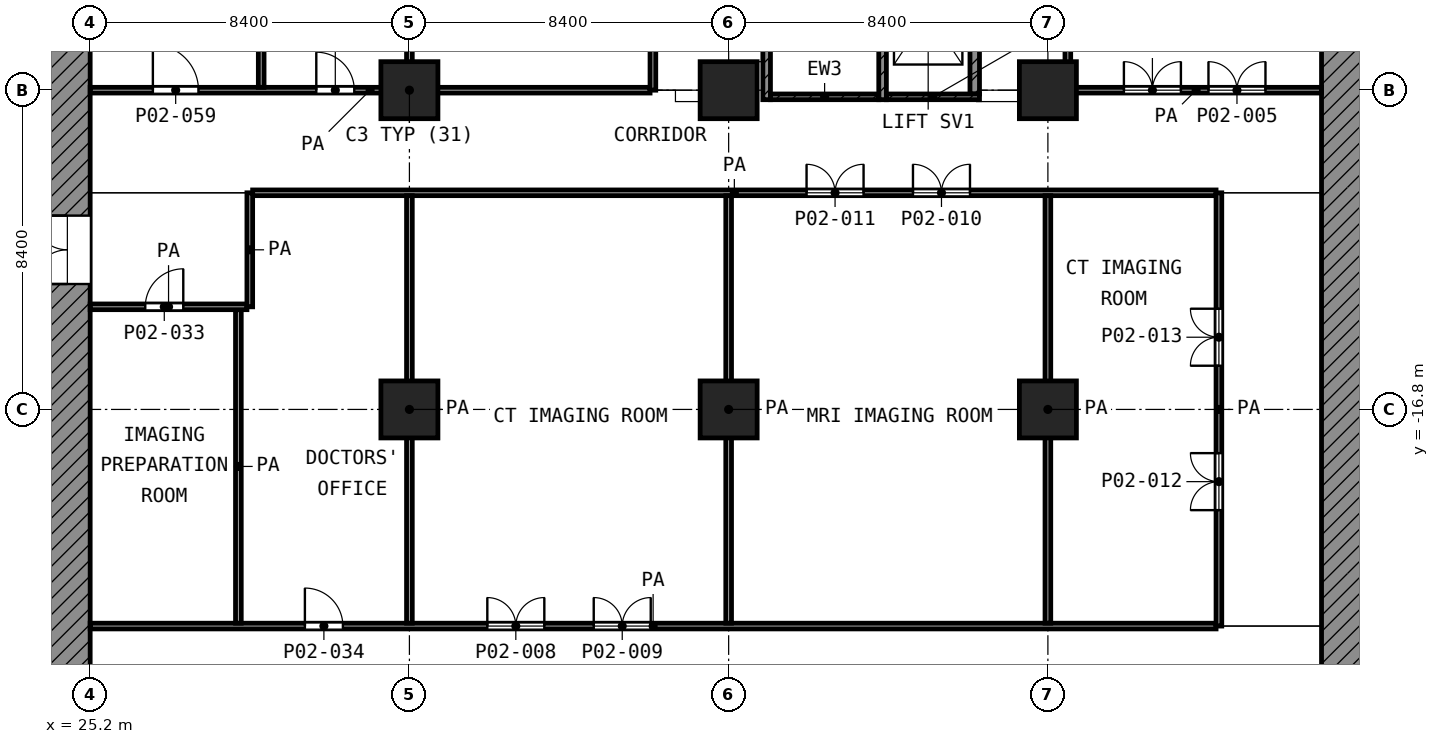
"""IFC4 building model, lengths in metres.
Left out: names, types, materials, properties, quantities, classifications, styles, units other than length and angle.
Written with IfcOpenShell. Run it as: python <this file> out.ifc"""

import sys

from ifc_helpers import new_model, si_unit, direction, frame, frame_2d, origin, origin_2d, place, context, subcontext, project, spatial, polyline, rectangle, outline, extrude, element, fill, save


model = new_model("IFC4")
c1 = context("Model", 3, precision=1e-05, world=origin(), true_north=direction((0.0, 1.0)))
c2 = subcontext(c1, "Body", "Model", "MODEL_VIEW")
j1 = project(units=[si_unit("LENGTHUNIT", "METRE"), si_unit("PLANEANGLEUNIT", "RADIAN")], contexts=[c1])
p1 = place(None, origin())
s1 = spatial("IfcSite", under=j1, at=p1, CompositionType="ELEMENT")
p2 = place(p1, origin())
s2 = spatial("IfcBuilding", under=s1, at=p2, CompositionType="ELEMENT")
p3 = place(p2, frame((0.0, 0.0, 7.0)))
s3 = spatial("IfcBuildingStorey", under=s2, at=p3, CompositionType="ELEMENT", Elevation=7.0)
for number, where, z_axis, x_axis in (
    (1, (33.6, -8.4, 0.0), (0.0, 0.0, 1.0), (1.0, 0.0, 0.0)),
    (2, (42.0, -8.4, 0.0), (0.0, 0.0, 1.0), (1.0, 0.0, 0.0)),
    (3, (50.4, -8.4, 0.0), (0.0, 0.0, 1.0), (1.0, 0.0, 0.0)),
    (4, (33.6, -16.8, 0.0), (0.0, 0.0, 1.0), (1.0, 0.0, 0.0)),
    (5, (42.0, -16.8, 0.0), (0.0, 0.0, 1.0), (1.0, 0.0, 0.0)),
    (6, (50.4, -16.8, 0.0), (0.0, 0.0, 1.0), (1.0, 0.0, 0.0)),
):
    element("IfcColumn", number, at=place(p3, frame(where, z_axis=z_axis, x_axis=x_axis)), inside=s3, PredefinedType="COLUMN", context=c2, shape_type="SweptSolid", body=[
        extrude(rectangle(XDim=1.5, YDim=1.5, at=origin_2d()), origin(), (0.0, 0.0, 1.0), 5.6),
    ])
p4 = place(p3, frame((0.0, 0.0, -7.0), z_axis=(0.0, -1.0, 0.0), x_axis=(1.0, 0.0, 0.0)))
e7 = element("IfcWall", 7, at=p4, inside=s3, PredefinedType="SHEAR", context=c2, shape_type="SweptSolid", body=[
    extrude(outline(polyline([(60.448, 12.6), (60.159, 11.256), (60.0, 9.0), (60.0, 7.0), (57.6, 7.0), (57.6, 12.6), (60.448, 12.6)])), origin(), (0.0, 0.0, 1.0), 33.6),
])
p5 = place(p3, frame((24.6, -24.0, 0.0), z_axis=(0.0, 0.0, 1.0), x_axis=(0.0, 1.0, 0.0)))
e8 = element("IfcWall", 8, at=p5, inside=s3, PredefinedType="SHEAR", context=c2, shape_type="SweptSolid", body=[
    extrude(rectangle(XDim=18.6, YDim=1.2, at=frame_2d((9.3, 0.0))), origin(), (0.0, 0.0, 1.0), 5.25),
])
p6 = place(p5, frame((10.5, 0.0, 0.0)))
e9 = element("IfcOpeningElement", 9, at=p6, cuts=e8, PredefinedType="OPENING", context=c2, shape_type="SweptSolid", body=[
    extrude(rectangle(XDim=1.8, YDim=2.1, at=frame_2d((0.9, 1.05))), frame((0.0, 0.61, 0.0), z_axis=(0.0, -1.0, 0.0), x_axis=(1.0, 0.0, 0.0)), (0.0, 0.0, 1.0), 1.22),
])
p7 = place(p3, frame((43.0, -8.65, 0.0), z_axis=(0.0, 0.0, 1.0), x_axis=(0.0, 1.0, 0.0)))
e10 = element("IfcWall", 10, at=p7, inside=s3, PredefinedType="SHEAR", context=c2, shape_type="SweptSolid", body=[
    extrude(rectangle(XDim=8.35, YDim=0.2, at=frame_2d((4.175, 0.0))), origin(), (0.0, 0.0, 1.0), 5.25),
])
p8 = place(p7, frame((7.0, 0.0, 0.0)))
e11 = element("IfcOpeningElement", 11, at=p8, cuts=e10, PredefinedType="OPENING", context=c2, shape_type="SweptSolid", body=[
    extrude(rectangle(XDim=1.1, YDim=2.1, at=frame_2d((0.55, 1.05))), frame((0.0, 0.11, 0.0), z_axis=(0.0, -1.0, 0.0), x_axis=(1.0, 0.0, 0.0)), (0.0, 0.0, 1.0), 0.22),
])
p9 = place(p3, frame((46.05, -8.65, 0.0), z_axis=(0.0, 0.0, 1.0), x_axis=(0.0, 1.0, 0.0)))
e12 = element("IfcWall", 12, at=p9, inside=s3, PredefinedType="SHEAR", context=c2, shape_type="SweptSolid", body=[
    extrude(rectangle(XDim=8.35, YDim=0.2, at=frame_2d((4.175, 0.0))), origin(), (0.0, 0.0, 1.0), 5.25),
])
p10 = place(p9, frame((7.0, 0.0, 0.0)))
e13 = element("IfcOpeningElement", 13, at=p10, cuts=e12, PredefinedType="OPENING", context=c2, shape_type="SweptSolid", body=[
    extrude(rectangle(XDim=1.1, YDim=2.1, at=frame_2d((0.55, 1.05))), frame((0.0, 0.11, 0.0), z_axis=(0.0, -1.0, 0.0), x_axis=(1.0, 0.0, 0.0)), (0.0, 0.0, 1.0), 0.22),
])
p11 = place(p3, frame((43.1, -8.575, 0.0), z_axis=(0.0, 0.0, 1.0), x_axis=(1.0, 0.0, 0.0)))
e14 = element("IfcWall", 14, at=p11, inside=s3, PredefinedType="SHEAR", context=c2, shape_type="SweptSolid", body=[
    extrude(rectangle(XDim=2.85, YDim=0.15, at=frame_2d((1.425, 0.0))), origin(), (0.0, 0.0, 1.0), 5.25),
])
p12 = place(p3, frame((46.15, -8.575, 0.0), z_axis=(0.0, 0.0, 1.0), x_axis=(1.0, 0.0, 0.0)))
e15 = element("IfcWall", 15, at=p12, inside=s3, PredefinedType="SHEAR", context=c2, shape_type="SweptSolid", body=[
    extrude(rectangle(XDim=2.45, YDim=0.15, at=frame_2d((1.225, 0.0))), origin(), (0.0, 0.0, 1.0), 5.25),
])
p13 = place(p3, frame((48.475, -8.5, 0.0), z_axis=(0.0, 0.0, 1.0), x_axis=(0.0, 1.0, 0.0)))
e16 = element("IfcWall", 16, at=p13, inside=s3, PredefinedType="SHEAR", context=c2, shape_type="SweptSolid", body=[
    extrude(rectangle(XDim=3.475, YDim=0.25, at=frame_2d((1.738, 0.0))), origin(), (0.0, 0.0, 1.0), 5.25),
])
p14 = place(p3, frame((25.2, -22.5, 0.0), z_axis=(0.0, 0.0, 1.0), x_axis=(1.0, 0.0, 0.0)))
e17 = element("IfcWall", 17, at=p14, inside=s3, PredefinedType="PARTITIONING", context=c2, shape_type="SweptSolid", body=[
    extrude(rectangle(XDim=29.625, YDim=0.15, at=frame_2d((14.812, 0.0))), origin(), (0.0, 0.0, 1.0), 5.25),
])
p15 = place(p14, frame((5.65, 0.0, 0.0)))
e18 = element("IfcOpeningElement", 18, at=p15, cuts=e17, PredefinedType="OPENING", context=c2, shape_type="SweptSolid", body=[
    extrude(rectangle(XDim=1.0, YDim=2.1, at=frame_2d((0.5, 1.05))), frame((0.0, 0.085, 0.0), z_axis=(0.0, -1.0, 0.0), x_axis=(1.0, 0.0, 0.0)), (0.0, 0.0, 1.0), 0.17),
])
p16 = place(p14, frame((10.45, 0.0, 0.0)))
e19 = element("IfcOpeningElement", 19, at=p16, cuts=e17, PredefinedType="OPENING", context=c2, shape_type="SweptSolid", body=[
    extrude(rectangle(XDim=1.5, YDim=2.1, at=frame_2d((0.75, 1.05))), frame((0.0, 0.085, 0.0), z_axis=(0.0, -1.0, 0.0), x_axis=(1.0, 0.0, 0.0)), (0.0, 0.0, 1.0), 0.17),
])
p17 = place(p14, frame((13.25, 0.0, 0.0)))
e20 = element("IfcOpeningElement", 20, at=p17, cuts=e17, PredefinedType="OPENING", context=c2, shape_type="SweptSolid", body=[
    extrude(rectangle(XDim=1.5, YDim=2.1, at=frame_2d((0.75, 1.05))), frame((0.0, 0.085, 0.0), z_axis=(0.0, -1.0, 0.0), x_axis=(1.0, 0.0, 0.0)), (0.0, 0.0, 1.0), 0.17),
])
p18 = place(p3, frame((25.2, -14.1, 0.0), z_axis=(0.0, 0.0, 1.0), x_axis=(1.0, 0.0, 0.0)))
e21 = element("IfcWall", 21, at=p18, inside=s3, PredefinedType="PARTITIONING", context=c2, shape_type="SweptSolid", body=[
    extrude(rectangle(XDim=4.125, YDim=0.15, at=frame_2d((2.062, 0.0))), origin(), (0.0, 0.0, 1.0), 5.25),
])
p19 = place(p18, frame((1.45, 0.0, 0.0)))
e22 = element("IfcOpeningElement", 22, at=p19, cuts=e21, PredefinedType="OPENING", context=c2, shape_type="SweptSolid", body=[
    extrude(rectangle(XDim=1.0, YDim=2.1, at=frame_2d((0.5, 1.05))), frame((0.0, 0.085, 0.0), z_axis=(0.0, -1.0, 0.0), x_axis=(1.0, 0.0, 0.0)), (0.0, 0.0, 1.0), 0.17),
])
p20 = place(p3, frame((29.475, -11.1, 0.0), z_axis=(0.0, 0.0, 1.0), x_axis=(1.0, 0.0, 0.0)))
e23 = element("IfcWall", 23, at=p20, inside=s3, PredefinedType="PARTITIONING", context=c2, shape_type="SweptSolid", body=[
    extrude(rectangle(XDim=25.35, YDim=0.15, at=frame_2d((12.675, 0.0))), origin(), (0.0, 0.0, 1.0), 5.25),
])
p21 = place(p20, frame((17.375, 0.0, 0.0)))
e24 = element("IfcOpeningElement", 24, at=p21, cuts=e23, PredefinedType="OPENING", context=c2, shape_type="SweptSolid", body=[
    extrude(rectangle(XDim=1.5, YDim=2.1, at=frame_2d((0.75, 1.05))), frame((0.0, 0.085, 0.0), z_axis=(0.0, -1.0, 0.0), x_axis=(1.0, 0.0, 0.0)), (0.0, 0.0, 1.0), 0.17),
])
p22 = place(p20, frame((14.575, 0.0, 0.0)))
e25 = element("IfcOpeningElement", 25, at=p22, cuts=e23, PredefinedType="OPENING", context=c2, shape_type="SweptSolid", body=[
    extrude(rectangle(XDim=1.5, YDim=2.1, at=frame_2d((0.75, 1.05))), frame((0.0, 0.085, 0.0), z_axis=(0.0, -1.0, 0.0), x_axis=(1.0, 0.0, 0.0)), (0.0, 0.0, 1.0), 0.17),
])
p23 = place(p3, frame((25.2, -8.4, 0.0), z_axis=(0.0, 0.0, 1.0), x_axis=(1.0, 0.0, 0.0)))
e26 = element("IfcWall", 26, at=p23, inside=s3, PredefinedType="PARTITIONING", context=c2, shape_type="SweptSolid", body=[
    extrude(rectangle(XDim=14.732, YDim=0.15, at=frame_2d((7.366, 0.0))), origin(), (0.0, 0.0, 1.0), 5.25),
])
p24 = place(p23, frame((1.65, 0.0, 0.0)))
e27 = element("IfcOpeningElement", 27, at=p24, cuts=e26, PredefinedType="OPENING", context=c2, shape_type="SweptSolid", body=[
    extrude(rectangle(XDim=1.2, YDim=2.1, at=frame_2d((0.6, 1.05))), frame((0.0, 0.085, 0.0), z_axis=(0.0, -1.0, 0.0), x_axis=(1.0, 0.0, 0.0)), (0.0, 0.0, 1.0), 0.17),
])
p25 = place(p23, frame((5.95, 0.0, 0.0)))
e28 = element("IfcOpeningElement", 28, at=p25, cuts=e26, PredefinedType="OPENING", context=c2, shape_type="SweptSolid", body=[
    extrude(rectangle(XDim=1.0, YDim=2.1, at=frame_2d((0.5, 1.05))), frame((0.0, 0.085, 0.0), z_axis=(0.0, -1.0, 0.0), x_axis=(1.0, 0.0, 0.0)), (0.0, 0.0, 1.0), 0.17),
])
p26 = place(p3, frame((51.0, -8.4, 0.0), z_axis=(0.0, 0.0, 1.0), x_axis=(1.0, 0.0, 0.0)))
e29 = element("IfcWall", 29, at=p26, inside=s3, PredefinedType="PARTITIONING", context=c2, shape_type="SweptSolid", body=[
    extrude(rectangle(XDim=6.6, YDim=0.15, at=frame_2d((3.3, 0.0))), origin(), (0.0, 0.0, 1.0), 5.25),
])
p27 = place(p26, frame((1.4, 0.0, 0.0)))
e30 = element("IfcOpeningElement", 30, at=p27, cuts=e29, PredefinedType="OPENING", context=c2, shape_type="SweptSolid", body=[
    extrude(rectangle(XDim=1.5, YDim=2.1, at=frame_2d((0.75, 1.05))), frame((0.0, 0.085, 0.0), z_axis=(0.0, -1.0, 0.0), x_axis=(1.0, 0.0, 0.0)), (0.0, 0.0, 1.0), 0.17),
])
p28 = place(p26, frame((3.625, 0.0, 0.0)))
e31 = element("IfcOpeningElement", 31, at=p28, cuts=e29, PredefinedType="OPENING", context=c2, shape_type="SweptSolid", body=[
    extrude(rectangle(XDim=1.5, YDim=2.1, at=frame_2d((0.75, 1.05))), frame((0.0, 0.085, 0.0), z_axis=(0.0, -1.0, 0.0), x_axis=(1.0, 0.0, 0.0)), (0.0, 0.0, 1.0), 0.17),
])
p29 = place(p3, frame((29.1, -22.425, 0.0), z_axis=(0.0, 0.0, 1.0), x_axis=(0.0, 1.0, 0.0)))
e32 = element("IfcWall", 32, at=p29, inside=s3, PredefinedType="PARTITIONING", context=c2, shape_type="SweptSolid", body=[
    extrude(rectangle(XDim=8.25, YDim=0.15, at=frame_2d((4.125, 0.0))), origin(), (0.0, 0.0, 1.0), 5.25),
])
p30 = place(p3, frame((29.4, -14.1, 0.0), z_axis=(0.0, 0.0, 1.0), x_axis=(0.0, 1.0, 0.0)))
e33 = element("IfcWall", 33, at=p30, inside=s3, PredefinedType="PARTITIONING", context=c2, shape_type="SweptSolid", body=[
    extrude(rectangle(XDim=3.0, YDim=0.15, at=frame_2d((1.5, 0.0))), origin(), (0.0, 0.0, 1.0), 5.25),
])
p31 = place(p3, frame((29.7, -8.325, 0.0), z_axis=(0.0, 0.0, 1.0), x_axis=(0.0, 1.0, 0.0)))
e34 = element("IfcWall", 34, at=p31, inside=s3, PredefinedType="PARTITIONING", context=c2, shape_type="SweptSolid", body=[
    extrude(rectangle(XDim=8.805, YDim=0.15, at=frame_2d((4.402, 0.0))), origin(), (0.0, 0.0, 1.0), 3.85),
])
p32 = place(p3, frame((33.6, -22.425, 0.0), z_axis=(0.0, 0.0, 1.0), x_axis=(0.0, 1.0, 0.0)))
e35 = element("IfcWall", 35, at=p32, inside=s3, PredefinedType="PARTITIONING", context=c2, shape_type="SweptSolid", body=[
    extrude(rectangle(XDim=11.25, YDim=0.15, at=frame_2d((5.625, 0.0))), origin(), (0.0, 0.0, 1.0), 5.25),
])
p33 = place(p3, frame((33.6, -8.325, 0.0), z_axis=(0.0, 0.0, 1.0), x_axis=(0.0, 1.0, 0.0)))
e36 = element("IfcWall", 36, at=p33, inside=s3, PredefinedType="PARTITIONING", context=c2, shape_type="SweptSolid", body=[
    extrude(rectangle(XDim=8.322, YDim=0.15, at=frame_2d((4.161, 0.0))), origin(), (0.0, 0.0, 1.0), 5.25),
])
p34 = place(p3, frame((40.007, -8.4, 0.0), z_axis=(0.0, 0.0, 1.0), x_axis=(0.0, 1.0, 0.0)))
e37 = element("IfcWall", 37, at=p34, inside=s3, PredefinedType="PARTITIONING", context=c2, shape_type="SweptSolid", body=[
    extrude(rectangle(XDim=8.4, YDim=0.15, at=frame_2d((4.2, 0.0))), origin(), (0.0, 0.0, 1.0), 3.85),
])
p35 = place(p34, frame((2.05, 0.0, 0.0)))
e38 = element("IfcOpeningElement", 38, at=p35, cuts=e37, PredefinedType="OPENING", context=c2, shape_type="SweptSolid", body=[
    extrude(rectangle(XDim=1.5, YDim=2.1, at=frame_2d((0.75, 1.05))), frame((0.0, 0.085, 0.0), z_axis=(0.0, -1.0, 0.0), x_axis=(1.0, 0.0, 0.0)), (0.0, 0.0, 1.0), 0.17),
])
p36 = place(p34, frame((4.85, 0.0, 0.0)))
e39 = element("IfcOpeningElement", 39, at=p36, cuts=e37, PredefinedType="OPENING", context=c2, shape_type="SweptSolid", body=[
    extrude(rectangle(XDim=1.5, YDim=2.1, at=frame_2d((0.75, 1.05))), frame((0.0, 0.085, 0.0), z_axis=(0.0, -1.0, 0.0), x_axis=(1.0, 0.0, 0.0)), (0.0, 0.0, 1.0), 0.17),
])
for number, where, z_axis, x_axis in (
    (40, (42.0, -22.425, 0.0), (0.0, 0.0, 1.0), (0.0, 1.0, 0.0)),
    (41, (50.4, -22.425, 0.0), (0.0, 0.0, 1.0), (0.0, 1.0, 0.0)),
):
    element("IfcWall", number, at=place(p3, frame(where, z_axis=z_axis, x_axis=x_axis)), inside=s3, PredefinedType="PARTITIONING", context=c2, shape_type="SweptSolid", body=[
        extrude(rectangle(XDim=11.25, YDim=0.15, at=frame_2d((5.625, 0.0))), origin(), (0.0, 0.0, 1.0), 5.25),
    ])
p37 = place(p3, frame((50.925, -8.4, 0.0), z_axis=(0.0, 0.0, 1.0), x_axis=(0.0, 1.0, 0.0)))
e42 = element("IfcWall", 42, at=p37, inside=s3, PredefinedType="PARTITIONING", context=c2, shape_type="SweptSolid", body=[
    extrude(rectangle(XDim=6.548, YDim=0.15, at=frame_2d((3.274, 0.0))), origin(), (0.0, 0.0, 1.0), 5.25),
])
p38 = place(p3, frame((54.9, -22.5, 0.0), z_axis=(0.0, 0.0, 1.0), x_axis=(0.0, 1.0, 0.0)))
e43 = element("IfcWall", 43, at=p38, inside=s3, PredefinedType="PARTITIONING", context=c2, shape_type="SweptSolid", body=[
    extrude(rectangle(XDim=11.4, YDim=0.15, at=frame_2d((5.7, 0.0))), origin(), (0.0, 0.0, 1.0), 5.25),
])
p39 = place(p38, frame((3.05, 0.0, 0.0)))
e44 = element("IfcOpeningElement", 44, at=p39, cuts=e43, PredefinedType="OPENING", context=c2, shape_type="SweptSolid", body=[
    extrude(rectangle(XDim=1.5, YDim=2.1, at=frame_2d((0.75, 1.05))), frame((0.0, 0.085, 0.0), z_axis=(0.0, -1.0, 0.0), x_axis=(1.0, 0.0, 0.0)), (0.0, 0.0, 1.0), 0.17),
])
p40 = place(p38, frame((6.85, 0.0, 0.0)))
e45 = element("IfcOpeningElement", 45, at=p40, cuts=e43, PredefinedType="OPENING", context=c2, shape_type="SweptSolid", body=[
    extrude(rectangle(XDim=1.5, YDim=2.1, at=frame_2d((0.75, 1.05))), frame((0.0, 0.085, 0.0), z_axis=(0.0, -1.0, 0.0), x_axis=(1.0, 0.0, 0.0)), (0.0, 0.0, 1.0), 0.17),
])
p41 = place(p6, origin())
e46 = element("IfcDoor", 46, at=p41, inside=s3, OperationType="DOUBLE_DOOR_SINGLE_SWING", PredefinedType="DOOR", context=c2, shape_type="SweptSolid", body=[
    extrude(rectangle(XDim=1.8, YDim=2.1, at=frame_2d((0.9, 1.05))), frame((0.0, 0.025, 0.0), z_axis=(0.0, -1.0, 0.0), x_axis=(1.0, 0.0, 0.0)), (0.0, 0.0, 1.0), 0.05),
])
fill(e9, e46)
p42 = place(p24, origin())
e47 = element("IfcDoor", 47, at=p42, inside=s3, OperationType="SINGLE_SWING_LEFT", PredefinedType="DOOR", context=c2, shape_type="SweptSolid", body=[
    extrude(rectangle(XDim=1.2, YDim=2.1, at=frame_2d((0.6, 1.05))), frame((0.0, 0.025, 0.0), z_axis=(0.0, -1.0, 0.0), x_axis=(1.0, 0.0, 0.0)), (0.0, 0.0, 1.0), 0.05),
])
fill(e27, e47)
p43 = place(p25, origin())
e48 = element("IfcDoor", 48, at=p43, inside=s3, OperationType="SINGLE_SWING_LEFT", PredefinedType="DOOR", context=c2, shape_type="SweptSolid", body=[
    extrude(rectangle(XDim=1.0, YDim=2.1, at=frame_2d((0.5, 1.05))), frame((0.0, 0.025, 0.0), z_axis=(0.0, -1.0, 0.0), x_axis=(1.0, 0.0, 0.0)), (0.0, 0.0, 1.0), 0.05),
])
fill(e28, e48)
p44 = place(p27, origin())
e49 = element("IfcDoor", 49, at=p44, inside=s3, OperationType="DOUBLE_DOOR_SINGLE_SWING", PredefinedType="DOOR", context=c2, shape_type="SweptSolid", body=[
    extrude(rectangle(XDim=1.5, YDim=2.1, at=frame_2d((0.75, 1.05))), frame((0.0, 0.025, 0.0), z_axis=(0.0, -1.0, 0.0), x_axis=(1.0, 0.0, 0.0)), (0.0, 0.0, 1.0), 0.05),
])
fill(e30, e49)
p45 = place(p28, origin())
e50 = element("IfcDoor", 50, at=p45, inside=s3, OperationType="DOUBLE_DOOR_SINGLE_SWING", PredefinedType="DOOR", context=c2, shape_type="SweptSolid", body=[
    extrude(rectangle(XDim=1.5, YDim=2.1, at=frame_2d((0.75, 1.05))), frame((0.0, 0.025, 0.0), z_axis=(0.0, -1.0, 0.0), x_axis=(1.0, 0.0, 0.0)), (0.0, 0.0, 1.0), 0.05),
])
fill(e31, e50)
p46 = place(p19, origin())
e51 = element("IfcDoor", 51, at=p46, inside=s3, OperationType="SINGLE_SWING_RIGHT", PredefinedType="DOOR", context=c2, shape_type="SweptSolid", body=[
    extrude(rectangle(XDim=1.0, YDim=2.1, at=frame_2d((0.5, 1.05))), frame((0.0, 0.025, 0.0), z_axis=(0.0, -1.0, 0.0), x_axis=(1.0, 0.0, 0.0)), (0.0, 0.0, 1.0), 0.05),
])
fill(e22, e51)
p47 = place(p15, origin())
e52 = element("IfcDoor", 52, at=p47, inside=s3, OperationType="SINGLE_SWING_LEFT", PredefinedType="DOOR", context=c2, shape_type="SweptSolid", body=[
    extrude(rectangle(XDim=1.0, YDim=2.1, at=frame_2d((0.5, 1.05))), frame((0.0, 0.025, 0.0), z_axis=(0.0, -1.0, 0.0), x_axis=(1.0, 0.0, 0.0)), (0.0, 0.0, 1.0), 0.05),
])
fill(e18, e52)
p48 = place(p16, origin())
e53 = element("IfcDoor", 53, at=p48, inside=s3, OperationType="DOUBLE_DOOR_SINGLE_SWING", PredefinedType="DOOR", context=c2, shape_type="SweptSolid", body=[
    extrude(rectangle(XDim=1.5, YDim=2.1, at=frame_2d((0.75, 1.05))), frame((0.0, 0.025, 0.0), z_axis=(0.0, -1.0, 0.0), x_axis=(1.0, 0.0, 0.0)), (0.0, 0.0, 1.0), 0.05),
])
fill(e19, e53)
p49 = place(p17, origin())
e54 = element("IfcDoor", 54, at=p49, inside=s3, OperationType="DOUBLE_DOOR_SINGLE_SWING", PredefinedType="DOOR", context=c2, shape_type="SweptSolid", body=[
    extrude(rectangle(XDim=1.5, YDim=2.1, at=frame_2d((0.75, 1.05))), frame((0.0, 0.025, 0.0), z_axis=(0.0, -1.0, 0.0), x_axis=(1.0, 0.0, 0.0)), (0.0, 0.0, 1.0), 0.05),
])
fill(e20, e54)
p50 = place(p21, origin())
e55 = element("IfcDoor", 55, at=p50, inside=s3, OperationType="DOUBLE_DOOR_SINGLE_SWING", PredefinedType="DOOR", context=c2, shape_type="SweptSolid", body=[
    extrude(rectangle(XDim=1.5, YDim=2.1, at=frame_2d((0.75, 1.05))), frame((0.0, 0.025, 0.0), z_axis=(0.0, -1.0, 0.0), x_axis=(1.0, 0.0, 0.0)), (0.0, 0.0, 1.0), 0.05),
])
fill(e24, e55)
p51 = place(p22, origin())
e56 = element("IfcDoor", 56, at=p51, inside=s3, OperationType="DOUBLE_DOOR_SINGLE_SWING", PredefinedType="DOOR", context=c2, shape_type="SweptSolid", body=[
    extrude(rectangle(XDim=1.5, YDim=2.1, at=frame_2d((0.75, 1.05))), frame((0.0, 0.025, 0.0), z_axis=(0.0, -1.0, 0.0), x_axis=(1.0, 0.0, 0.0)), (0.0, 0.0, 1.0), 0.05),
])
fill(e25, e56)
p52 = place(p39, origin())
e57 = element("IfcDoor", 57, at=p52, inside=s3, OperationType="DOUBLE_DOOR_SINGLE_SWING", PredefinedType="DOOR", context=c2, shape_type="SweptSolid", body=[
    extrude(rectangle(XDim=1.5, YDim=2.1, at=frame_2d((0.75, 1.05))), frame((0.0, 0.025, 0.0), z_axis=(0.0, -1.0, 0.0), x_axis=(1.0, 0.0, 0.0)), (0.0, 0.0, 1.0), 0.05),
])
fill(e44, e57)
p53 = place(p40, origin())
e58 = element("IfcDoor", 58, at=p53, inside=s3, OperationType="DOUBLE_DOOR_SINGLE_SWING", PredefinedType="DOOR", context=c2, shape_type="SweptSolid", body=[
    extrude(rectangle(XDim=1.5, YDim=2.1, at=frame_2d((0.75, 1.05))), frame((0.0, 0.025, 0.0), z_axis=(0.0, -1.0, 0.0), x_axis=(1.0, 0.0, 0.0)), (0.0, 0.0, 1.0), 0.05),
])
fill(e45, e58)
save(model, sys.argv[1])
